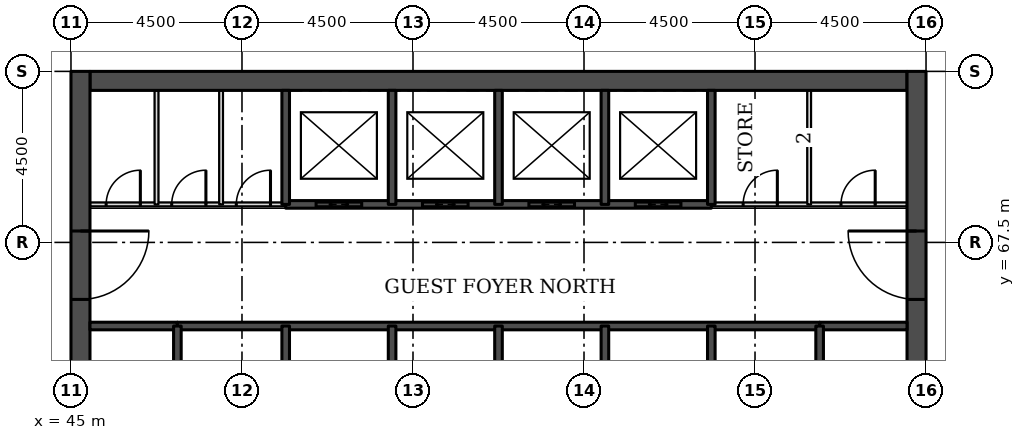
"""IFC4 building model, lengths in metres.
Left out: names, types, materials, properties, quantities, classifications, styles, units other than length and angle.
Written with IfcOpenShell. Run it as: python <this file> out.ifc"""

import sys

from ifc_helpers import new_model, si_unit, direction, frame, frame_2d, origin, place, context, subcontext, project, spatial, rectangle, extrude, element, fill, save


model = new_model("IFC4")
c1 = context("Model", 3, precision=1e-05, world=origin(), true_north=direction((0.0, 1.0)))
c2 = subcontext(c1, "Body", "Model", "MODEL_VIEW")
j1 = project(units=[si_unit("LENGTHUNIT", "METRE"), si_unit("PLANEANGLEUNIT", "RADIAN")], contexts=[c1])
p1 = place(None, origin())
s1 = spatial("IfcSite", under=j1, at=p1, CompositionType="ELEMENT")
p2 = place(p1, origin())
s2 = spatial("IfcBuilding", under=s1, at=p2, CompositionType="ELEMENT")
p3 = place(p2, frame((0.0, 0.0, 49.5)))
s3 = spatial("IfcBuildingStorey", under=s2, at=p3, CompositionType="ELEMENT", Elevation=49.5)
p4 = place(p3, frame((45.5, 71.75, 0.0), z_axis=(0.0, 0.0, 1.0), x_axis=(1.0, 0.0, 0.0)))
e1 = element("IfcWall", 1, at=p4, inside=s3, PredefinedType="SHEAR", context=c2, shape_type="SweptSolid", body=[
    extrude(rectangle(XDim=21.5, YDim=0.5, at=frame_2d((10.75, 0.0))), origin(), (0.0, 0.0, 1.0), 3.3),
])
p5 = place(p3, frame((45.25, 49.5, 0.0), z_axis=(0.0, 0.0, 1.0), x_axis=(0.0, 1.0, 0.0)))
e2 = element("IfcWall", 2, at=p5, inside=s3, PredefinedType="SHEAR", context=c2, shape_type="SweptSolid", body=[
    extrude(rectangle(XDim=22.5, YDim=0.5, at=frame_2d((11.25, 0.0))), origin(), (0.0, 0.0, 1.0), 3.3),
])
p6 = place(p5, frame((4.2, 0.0, 0.0)))
e3 = element("IfcOpeningElement", 3, at=p6, cuts=e2, PredefinedType="OPENING", context=c2, shape_type="SweptSolid", body=[
    extrude(rectangle(XDim=1.8, YDim=2.1, at=frame_2d((0.9, 1.05))), frame((0.0, 0.26, 0.0), z_axis=(0.0, -1.0, 0.0), x_axis=(1.0, 0.0, 0.0)), (0.0, 0.0, 1.0), 0.52),
])
p7 = place(p5, frame((6.9, 0.0, 0.0)))
e4 = element("IfcOpeningElement", 4, at=p7, cuts=e2, PredefinedType="OPENING", context=c2, shape_type="SweptSolid", body=[
    extrude(rectangle(XDim=1.1, YDim=2.1, at=frame_2d((0.55, 1.05))), frame((0.0, 0.26, 0.0), z_axis=(0.0, -1.0, 0.0), x_axis=(1.0, 0.0, 0.0)), (0.0, 0.0, 1.0), 0.52),
])
p8 = place(p5, frame((13.6, 0.0, 0.0)))
e5 = element("IfcOpeningElement", 5, at=p8, cuts=e2, PredefinedType="OPENING", context=c2, shape_type="SweptSolid", body=[
    extrude(rectangle(XDim=1.1, YDim=2.1, at=frame_2d((0.55, 1.05))), frame((0.0, 0.26, 0.0), z_axis=(0.0, -1.0, 0.0), x_axis=(1.0, 0.0, 0.0)), (0.0, 0.0, 1.0), 0.52),
])
p9 = place(p5, frame((16.5, 0.0, 0.0)))
e6 = element("IfcOpeningElement", 6, at=p9, cuts=e2, PredefinedType="OPENING", context=c2, shape_type="SweptSolid", body=[
    extrude(rectangle(XDim=1.8, YDim=2.1, at=frame_2d((0.9, 1.05))), frame((0.0, 0.26, 0.0), z_axis=(0.0, -1.0, 0.0), x_axis=(1.0, 0.0, 0.0)), (0.0, 0.0, 1.0), 0.52),
])
p10 = place(p3, frame((67.25, 49.5, 0.0), z_axis=(0.0, 0.0, 1.0), x_axis=(0.0, 1.0, 0.0)))
e7 = element("IfcWall", 7, at=p10, inside=s3, PredefinedType="SHEAR", context=c2, shape_type="SweptSolid", body=[
    extrude(rectangle(XDim=22.5, YDim=0.5, at=frame_2d((11.25, 0.0))), origin(), (0.0, 0.0, 1.0), 3.3),
])
p11 = place(p10, frame((4.2, 0.0, 0.0)))
e8 = element("IfcOpeningElement", 8, at=p11, cuts=e7, PredefinedType="OPENING", context=c2, shape_type="SweptSolid", body=[
    extrude(rectangle(XDim=1.8, YDim=2.1, at=frame_2d((0.9, 1.05))), frame((0.0, 0.26, 0.0), z_axis=(0.0, -1.0, 0.0), x_axis=(1.0, 0.0, 0.0)), (0.0, 0.0, 1.0), 0.52),
])
p12 = place(p10, frame((6.9, 0.0, 0.0)))
e9 = element("IfcOpeningElement", 9, at=p12, cuts=e7, PredefinedType="OPENING", context=c2, shape_type="SweptSolid", body=[
    extrude(rectangle(XDim=1.1, YDim=2.1, at=frame_2d((0.55, 1.05))), frame((0.0, 0.26, 0.0), z_axis=(0.0, -1.0, 0.0), x_axis=(1.0, 0.0, 0.0)), (0.0, 0.0, 1.0), 0.52),
])
p13 = place(p10, frame((13.6, 0.0, 0.0)))
e10 = element("IfcOpeningElement", 10, at=p13, cuts=e7, PredefinedType="OPENING", context=c2, shape_type="SweptSolid", body=[
    extrude(rectangle(XDim=1.1, YDim=2.1, at=frame_2d((0.55, 1.05))), frame((0.0, 0.26, 0.0), z_axis=(0.0, -1.0, 0.0), x_axis=(1.0, 0.0, 0.0)), (0.0, 0.0, 1.0), 0.52),
])
p14 = place(p10, frame((16.5, 0.0, 0.0)))
e11 = element("IfcOpeningElement", 11, at=p14, cuts=e7, PredefinedType="OPENING", context=c2, shape_type="SweptSolid", body=[
    extrude(rectangle(XDim=1.8, YDim=2.1, at=frame_2d((0.9, 1.05))), frame((0.0, 0.26, 0.0), z_axis=(0.0, -1.0, 0.0), x_axis=(1.0, 0.0, 0.0)), (0.0, 0.0, 1.0), 0.52),
])
for number, where, z_axis, x_axis in (
    (12, (45.5, 65.3, 0.0), (0.0, 0.0, 1.0), (1.0, 0.0, 0.0)),
    (13, (64.7, 65.3, 0.0), (0.0, 0.0, 1.0), (1.0, 0.0, 0.0)),
):
    element("IfcWall", number, at=place(p3, frame(where, z_axis=z_axis, x_axis=x_axis)), inside=s3, PredefinedType="SOLIDWALL", context=c2, shape_type="SweptSolid", body=[
        extrude(rectangle(XDim=2.3, YDim=0.2, at=frame_2d((1.15, 0.0))), origin(), (0.0, 0.0, 1.0), 3.08),
    ])
p15 = place(p3, frame((47.8, 65.3, 0.0), z_axis=(0.0, 0.0, 1.0), x_axis=(1.0, 0.0, 0.0)))
e14 = element("IfcWall", 14, at=p15, inside=s3, PredefinedType="SOLIDWALL", context=c2, shape_type="SweptSolid", body=[
    extrude(rectangle(XDim=16.9, YDim=0.2, at=frame_2d((8.45, 0.0))), origin(), (0.0, 0.0, 1.0), 3.08),
])
p16 = place(p3, frame((45.5, 68.5, 0.0), z_axis=(0.0, 0.0, 1.0), x_axis=(1.0, 0.0, 0.0)))
e15 = element("IfcWall", 15, at=p16, inside=s3, PredefinedType="PARTITIONING", context=c2, shape_type="SweptSolid", body=[
    extrude(rectangle(XDim=5.15, YDim=0.1, at=frame_2d((2.575, 0.0))), origin(), (0.0, 0.0, 1.0), 3.08),
])
p17 = place(p16, frame((0.426, 0.0, 0.0)))
e16 = element("IfcOpeningElement", 16, at=p17, cuts=e15, PredefinedType="OPENING", context=c2, shape_type="SweptSolid", body=[
    extrude(rectangle(XDim=0.9, YDim=2.1, at=frame_2d((0.45, 1.05))), frame((0.0, 0.06, 0.0), z_axis=(0.0, -1.0, 0.0), x_axis=(1.0, 0.0, 0.0)), (0.0, 0.0, 1.0), 0.12),
])
p18 = place(p16, frame((2.151, 0.0, 0.0)))
e17 = element("IfcOpeningElement", 17, at=p18, cuts=e15, PredefinedType="OPENING", context=c2, shape_type="SweptSolid", body=[
    extrude(rectangle(XDim=0.9, YDim=2.1, at=frame_2d((0.45, 1.05))), frame((0.0, 0.06, 0.0), z_axis=(0.0, -1.0, 0.0), x_axis=(1.0, 0.0, 0.0)), (0.0, 0.0, 1.0), 0.12),
])
p19 = place(p16, frame((3.85, 0.0, 0.0)))
e18 = element("IfcOpeningElement", 18, at=p19, cuts=e15, PredefinedType="OPENING", context=c2, shape_type="SweptSolid", body=[
    extrude(rectangle(XDim=0.9, YDim=2.1, at=frame_2d((0.45, 1.05))), frame((0.0, 0.06, 0.0), z_axis=(0.0, -1.0, 0.0), x_axis=(1.0, 0.0, 0.0)), (0.0, 0.0, 1.0), 0.12),
])
p20 = place(p3, frame((61.85, 68.5, 0.0), z_axis=(0.0, 0.0, 1.0), x_axis=(1.0, 0.0, 0.0)))
e19 = element("IfcWall", 19, at=p20, inside=s3, PredefinedType="PARTITIONING", context=c2, shape_type="SweptSolid", body=[
    extrude(rectangle(XDim=5.15, YDim=0.1, at=frame_2d((2.575, 0.0))), origin(), (0.0, 0.0, 1.0), 3.08),
])
p21 = place(p20, frame((3.413, 0.0, 0.0)))
e20 = element("IfcOpeningElement", 20, at=p21, cuts=e19, PredefinedType="OPENING", context=c2, shape_type="SweptSolid", body=[
    extrude(rectangle(XDim=0.9, YDim=2.1, at=frame_2d((0.45, 1.05))), frame((0.0, 0.06, 0.0), z_axis=(0.0, -1.0, 0.0), x_axis=(1.0, 0.0, 0.0)), (0.0, 0.0, 1.0), 0.12),
])
p22 = place(p20, frame((0.837, 0.0, 0.0)))
e21 = element("IfcOpeningElement", 21, at=p22, cuts=e19, PredefinedType="OPENING", context=c2, shape_type="SweptSolid", body=[
    extrude(rectangle(XDim=0.9, YDim=2.1, at=frame_2d((0.45, 1.05))), frame((0.0, 0.06, 0.0), z_axis=(0.0, -1.0, 0.0), x_axis=(1.0, 0.0, 0.0)), (0.0, 0.0, 1.0), 0.12),
])
p23 = place(p3, frame((50.65, 68.5, 0.0), z_axis=(0.0, 0.0, 1.0), x_axis=(1.0, 0.0, 0.0)))
e22 = element("IfcWall", 22, at=p23, inside=s3, PredefinedType="SOLIDWALL", context=c2, shape_type="SweptSolid", body=[
    extrude(rectangle(XDim=11.2, YDim=0.2, at=frame_2d((5.6, 0.0))), origin(), (0.0, 0.0, 1.0), 3.08),
])
p24 = place(p23, frame((0.8, 0.0, 0.0)))
e23 = element("IfcOpeningElement", 23, at=p24, cuts=e22, PredefinedType="OPENING", context=c2, shape_type="SweptSolid", body=[
    extrude(rectangle(XDim=1.2, YDim=2.1, at=frame_2d((0.6, 1.05))), frame((0.0, 0.11, 0.0), z_axis=(0.0, -1.0, 0.0), x_axis=(1.0, 0.0, 0.0)), (0.0, 0.0, 1.0), 0.22),
])
p25 = place(p23, frame((3.6, 0.0, 0.0)))
e24 = element("IfcOpeningElement", 24, at=p25, cuts=e22, PredefinedType="OPENING", context=c2, shape_type="SweptSolid", body=[
    extrude(rectangle(XDim=1.2, YDim=2.1, at=frame_2d((0.6, 1.05))), frame((0.0, 0.11, 0.0), z_axis=(0.0, -1.0, 0.0), x_axis=(1.0, 0.0, 0.0)), (0.0, 0.0, 1.0), 0.22),
])
p26 = place(p23, frame((6.4, 0.0, 0.0)))
e25 = element("IfcOpeningElement", 25, at=p26, cuts=e22, PredefinedType="OPENING", context=c2, shape_type="SweptSolid", body=[
    extrude(rectangle(XDim=1.2, YDim=2.1, at=frame_2d((0.6, 1.05))), frame((0.0, 0.11, 0.0), z_axis=(0.0, -1.0, 0.0), x_axis=(1.0, 0.0, 0.0)), (0.0, 0.0, 1.0), 0.22),
])
p27 = place(p23, frame((9.2, 0.0, 0.0)))
e26 = element("IfcOpeningElement", 26, at=p27, cuts=e22, PredefinedType="OPENING", context=c2, shape_type="SweptSolid", body=[
    extrude(rectangle(XDim=1.2, YDim=2.1, at=frame_2d((0.6, 1.05))), frame((0.0, 0.11, 0.0), z_axis=(0.0, -1.0, 0.0), x_axis=(1.0, 0.0, 0.0)), (0.0, 0.0, 1.0), 0.22),
])
p28 = place(p3, frame((47.251, 68.5, 0.0), z_axis=(0.0, 0.0, 1.0), x_axis=(0.0, 1.0, 0.0)))
e27 = element("IfcWall", 27, at=p28, inside=s3, PredefinedType="PARTITIONING", context=c2, shape_type="SweptSolid", body=[
    extrude(rectangle(XDim=3.0, YDim=0.1, at=frame_2d((1.5, 0.0))), origin(), (0.0, 0.0, 1.0), 3.08),
])
p29 = place(p3, frame((47.8, 62.0, 0.0), z_axis=(0.0, 0.0, 1.0), x_axis=(0.0, 1.0, 0.0)))
e28 = element("IfcWall", 28, at=p29, inside=s3, PredefinedType="SOLIDWALL", context=c2, shape_type="SweptSolid", body=[
    extrude(rectangle(XDim=3.3, YDim=0.2, at=frame_2d((1.65, 0.0))), origin(), (0.0, 0.0, 1.0), 3.08),
])
p30 = place(p29, frame((1.1, 0.0, 0.0)))
e29 = element("IfcOpeningElement", 29, at=p30, cuts=e28, PredefinedType="OPENING", context=c2, shape_type="SweptSolid", body=[
    extrude(rectangle(XDim=1.1, YDim=2.1, at=frame_2d((0.55, 1.05))), frame((0.0, 0.11, 0.0), z_axis=(0.0, -1.0, 0.0), x_axis=(1.0, 0.0, 0.0)), (0.0, 0.0, 1.0), 0.22),
])
p31 = place(p3, frame((48.95, 68.5, 0.0), z_axis=(0.0, 0.0, 1.0), x_axis=(0.0, 1.0, 0.0)))
e30 = element("IfcWall", 30, at=p31, inside=s3, PredefinedType="PARTITIONING", context=c2, shape_type="SweptSolid", body=[
    extrude(rectangle(XDim=3.0, YDim=0.1, at=frame_2d((1.5, 0.0))), origin(), (0.0, 0.0, 1.0), 3.08),
])
p32 = place(p3, frame((50.65, 62.0, 0.0), z_axis=(0.0, 0.0, 1.0), x_axis=(0.0, 1.0, 0.0)))
e31 = element("IfcWall", 31, at=p32, inside=s3, PredefinedType="SOLIDWALL", context=c2, shape_type="SweptSolid", body=[
    extrude(rectangle(XDim=3.3, YDim=0.2, at=frame_2d((1.65, 0.0))), origin(), (0.0, 0.0, 1.0), 3.08),
])
p33 = place(p3, frame((50.65, 68.5, 0.0), z_axis=(0.0, 0.0, 1.0), x_axis=(0.0, 1.0, 0.0)))
e32 = element("IfcWall", 32, at=p33, inside=s3, PredefinedType="SOLIDWALL", context=c2, shape_type="SweptSolid", body=[
    extrude(rectangle(XDim=3.0, YDim=0.2, at=frame_2d((1.5, 0.0))), origin(), (0.0, 0.0, 1.0), 3.08),
])
p34 = place(p3, frame((53.45, 62.5, 0.0), z_axis=(0.0, 0.0, 1.0), x_axis=(0.0, 1.0, 0.0)))
e33 = element("IfcWall", 33, at=p34, inside=s3, PredefinedType="SOLIDWALL", context=c2, shape_type="SweptSolid", body=[
    extrude(rectangle(XDim=2.8, YDim=0.2, at=frame_2d((1.4, 0.0))), origin(), (0.0, 0.0, 1.0), 3.08),
])
p35 = place(p3, frame((53.45, 68.5, 0.0), z_axis=(0.0, 0.0, 1.0), x_axis=(0.0, 1.0, 0.0)))
e34 = element("IfcWall", 34, at=p35, inside=s3, PredefinedType="SOLIDWALL", context=c2, shape_type="SweptSolid", body=[
    extrude(rectangle(XDim=3.0, YDim=0.2, at=frame_2d((1.5, 0.0))), origin(), (0.0, 0.0, 1.0), 3.08),
])
p36 = place(p3, frame((56.25, 62.5, 0.0), z_axis=(0.0, 0.0, 1.0), x_axis=(0.0, 1.0, 0.0)))
e35 = element("IfcWall", 35, at=p36, inside=s3, PredefinedType="SOLIDWALL", context=c2, shape_type="SweptSolid", body=[
    extrude(rectangle(XDim=2.8, YDim=0.2, at=frame_2d((1.4, 0.0))), origin(), (0.0, 0.0, 1.0), 3.08),
])
p37 = place(p3, frame((56.25, 68.5, 0.0), z_axis=(0.0, 0.0, 1.0), x_axis=(0.0, 1.0, 0.0)))
e36 = element("IfcWall", 36, at=p37, inside=s3, PredefinedType="SOLIDWALL", context=c2, shape_type="SweptSolid", body=[
    extrude(rectangle(XDim=3.0, YDim=0.2, at=frame_2d((1.5, 0.0))), origin(), (0.0, 0.0, 1.0), 3.08),
])
p38 = place(p3, frame((59.05, 62.5, 0.0), z_axis=(0.0, 0.0, 1.0), x_axis=(0.0, 1.0, 0.0)))
e37 = element("IfcWall", 37, at=p38, inside=s3, PredefinedType="SOLIDWALL", context=c2, shape_type="SweptSolid", body=[
    extrude(rectangle(XDim=2.8, YDim=0.2, at=frame_2d((1.4, 0.0))), origin(), (0.0, 0.0, 1.0), 3.08),
])
p39 = place(p3, frame((59.05, 68.5, 0.0), z_axis=(0.0, 0.0, 1.0), x_axis=(0.0, 1.0, 0.0)))
e38 = element("IfcWall", 38, at=p39, inside=s3, PredefinedType="SOLIDWALL", context=c2, shape_type="SweptSolid", body=[
    extrude(rectangle(XDim=3.0, YDim=0.2, at=frame_2d((1.5, 0.0))), origin(), (0.0, 0.0, 1.0), 3.08),
])
p40 = place(p3, frame((61.85, 62.0, 0.0), z_axis=(0.0, 0.0, 1.0), x_axis=(0.0, 1.0, 0.0)))
e39 = element("IfcWall", 39, at=p40, inside=s3, PredefinedType="SOLIDWALL", context=c2, shape_type="SweptSolid", body=[
    extrude(rectangle(XDim=3.3, YDim=0.2, at=frame_2d((1.65, 0.0))), origin(), (0.0, 0.0, 1.0), 3.08),
])
p41 = place(p3, frame((61.85, 68.5, 0.0), z_axis=(0.0, 0.0, 1.0), x_axis=(0.0, 1.0, 0.0)))
e40 = element("IfcWall", 40, at=p41, inside=s3, PredefinedType="SOLIDWALL", context=c2, shape_type="SweptSolid", body=[
    extrude(rectangle(XDim=3.0, YDim=0.2, at=frame_2d((1.5, 0.0))), origin(), (0.0, 0.0, 1.0), 3.08),
])
p42 = place(p3, frame((64.425, 68.5, 0.0), z_axis=(0.0, 0.0, 1.0), x_axis=(0.0, 1.0, 0.0)))
e41 = element("IfcWall", 41, at=p42, inside=s3, PredefinedType="PARTITIONING", context=c2, shape_type="SweptSolid", body=[
    extrude(rectangle(XDim=3.0, YDim=0.1, at=frame_2d((1.5, 0.0))), origin(), (0.0, 0.0, 1.0), 3.08),
])
p43 = place(p3, frame((64.7, 62.0, 0.0), z_axis=(0.0, 0.0, 1.0), x_axis=(0.0, 1.0, 0.0)))
e42 = element("IfcWall", 42, at=p43, inside=s3, PredefinedType="SOLIDWALL", context=c2, shape_type="SweptSolid", body=[
    extrude(rectangle(XDim=3.3, YDim=0.2, at=frame_2d((1.65, 0.0))), origin(), (0.0, 0.0, 1.0), 3.08),
])
p44 = place(p43, frame((1.1, 0.0, 0.0)))
e43 = element("IfcOpeningElement", 43, at=p44, cuts=e42, PredefinedType="OPENING", context=c2, shape_type="SweptSolid", body=[
    extrude(rectangle(XDim=1.1, YDim=2.1, at=frame_2d((0.55, 1.05))), frame((0.0, 0.11, 0.0), z_axis=(0.0, -1.0, 0.0), x_axis=(1.0, 0.0, 0.0)), (0.0, 0.0, 1.0), 0.22),
])
p45 = place(p24, origin())
e44 = element("IfcDoor", 44, at=p45, inside=s3, OperationType="DOUBLE_DOOR_SLIDING", PredefinedType="DOOR", context=c2, shape_type="SweptSolid", body=[
    extrude(rectangle(XDim=1.2, YDim=2.1, at=frame_2d((0.6, 1.05))), frame((0.0, 0.025, 0.0), z_axis=(0.0, -1.0, 0.0), x_axis=(1.0, 0.0, 0.0)), (0.0, 0.0, 1.0), 0.05),
])
fill(e23, e44)
p46 = place(p25, origin())
e45 = element("IfcDoor", 45, at=p46, inside=s3, OperationType="DOUBLE_DOOR_SLIDING", PredefinedType="DOOR", context=c2, shape_type="SweptSolid", body=[
    extrude(rectangle(XDim=1.2, YDim=2.1, at=frame_2d((0.6, 1.05))), frame((0.0, 0.025, 0.0), z_axis=(0.0, -1.0, 0.0), x_axis=(1.0, 0.0, 0.0)), (0.0, 0.0, 1.0), 0.05),
])
fill(e24, e45)
p47 = place(p26, origin())
e46 = element("IfcDoor", 46, at=p47, inside=s3, OperationType="DOUBLE_DOOR_SLIDING", PredefinedType="DOOR", context=c2, shape_type="SweptSolid", body=[
    extrude(rectangle(XDim=1.2, YDim=2.1, at=frame_2d((0.6, 1.05))), frame((0.0, 0.025, 0.0), z_axis=(0.0, -1.0, 0.0), x_axis=(1.0, 0.0, 0.0)), (0.0, 0.0, 1.0), 0.05),
])
fill(e25, e46)
p48 = place(p27, origin())
e47 = element("IfcDoor", 47, at=p48, inside=s3, OperationType="DOUBLE_DOOR_SLIDING", PredefinedType="DOOR", context=c2, shape_type="SweptSolid", body=[
    extrude(rectangle(XDim=1.2, YDim=2.1, at=frame_2d((0.6, 1.05))), frame((0.0, 0.025, 0.0), z_axis=(0.0, -1.0, 0.0), x_axis=(1.0, 0.0, 0.0)), (0.0, 0.0, 1.0), 0.05),
])
fill(e26, e47)
p49 = place(p9, frame((1.8, 0.0, 0.0), z_axis=(0.0, 0.0, 1.0), x_axis=(-1.0, 0.0, 0.0)))
e48 = element("IfcDoor", 48, at=p49, inside=s3, OperationType="SINGLE_SWING_LEFT", PredefinedType="DOOR", context=c2, shape_type="SweptSolid", body=[
    extrude(rectangle(XDim=1.8, YDim=2.1, at=frame_2d((0.9, 1.05))), frame((0.0, 0.025, 0.0), z_axis=(0.0, -1.0, 0.0), x_axis=(1.0, 0.0, 0.0)), (0.0, 0.0, 1.0), 0.05),
])
fill(e6, e48)
p50 = place(p14, origin())
e49 = element("IfcDoor", 49, at=p50, inside=s3, OperationType="SINGLE_SWING_RIGHT", PredefinedType="DOOR", context=c2, shape_type="SweptSolid", body=[
    extrude(rectangle(XDim=1.8, YDim=2.1, at=frame_2d((0.9, 1.05))), frame((0.0, 0.025, 0.0), z_axis=(0.0, -1.0, 0.0), x_axis=(1.0, 0.0, 0.0)), (0.0, 0.0, 1.0), 0.05),
])
fill(e11, e49)
p51 = place(p21, origin())
e50 = element("IfcDoor", 50, at=p51, inside=s3, OperationType="SINGLE_SWING_RIGHT", PredefinedType="DOOR", context=c2, shape_type="SweptSolid", body=[
    extrude(rectangle(XDim=0.9, YDim=2.1, at=frame_2d((0.45, 1.05))), frame((0.0, 0.025, 0.0), z_axis=(0.0, -1.0, 0.0), x_axis=(1.0, 0.0, 0.0)), (0.0, 0.0, 1.0), 0.05),
])
fill(e20, e50)
p52 = place(p22, origin())
e51 = element("IfcDoor", 51, at=p52, inside=s3, OperationType="SINGLE_SWING_RIGHT", PredefinedType="DOOR", context=c2, shape_type="SweptSolid", body=[
    extrude(rectangle(XDim=0.9, YDim=2.1, at=frame_2d((0.45, 1.05))), frame((0.0, 0.025, 0.0), z_axis=(0.0, -1.0, 0.0), x_axis=(1.0, 0.0, 0.0)), (0.0, 0.0, 1.0), 0.05),
])
fill(e21, e51)
p53 = place(p17, origin())
e52 = element("IfcDoor", 52, at=p53, inside=s3, OperationType="SINGLE_SWING_RIGHT", PredefinedType="DOOR", context=c2, shape_type="SweptSolid", body=[
    extrude(rectangle(XDim=0.9, YDim=2.1, at=frame_2d((0.45, 1.05))), frame((0.0, 0.025, 0.0), z_axis=(0.0, -1.0, 0.0), x_axis=(1.0, 0.0, 0.0)), (0.0, 0.0, 1.0), 0.05),
])
fill(e16, e52)
p54 = place(p18, origin())
e53 = element("IfcDoor", 53, at=p54, inside=s3, OperationType="SINGLE_SWING_RIGHT", PredefinedType="DOOR", context=c2, shape_type="SweptSolid", body=[
    extrude(rectangle(XDim=0.9, YDim=2.1, at=frame_2d((0.45, 1.05))), frame((0.0, 0.025, 0.0), z_axis=(0.0, -1.0, 0.0), x_axis=(1.0, 0.0, 0.0)), (0.0, 0.0, 1.0), 0.05),
])
fill(e17, e53)
p55 = place(p19, origin())
e54 = element("IfcDoor", 54, at=p55, inside=s3, OperationType="SINGLE_SWING_RIGHT", PredefinedType="DOOR", context=c2, shape_type="SweptSolid", body=[
    extrude(rectangle(XDim=0.9, YDim=2.1, at=frame_2d((0.45, 1.05))), frame((0.0, 0.025, 0.0), z_axis=(0.0, -1.0, 0.0), x_axis=(1.0, 0.0, 0.0)), (0.0, 0.0, 1.0), 0.05),
])
fill(e18, e54)
save(model, sys.argv[1])
